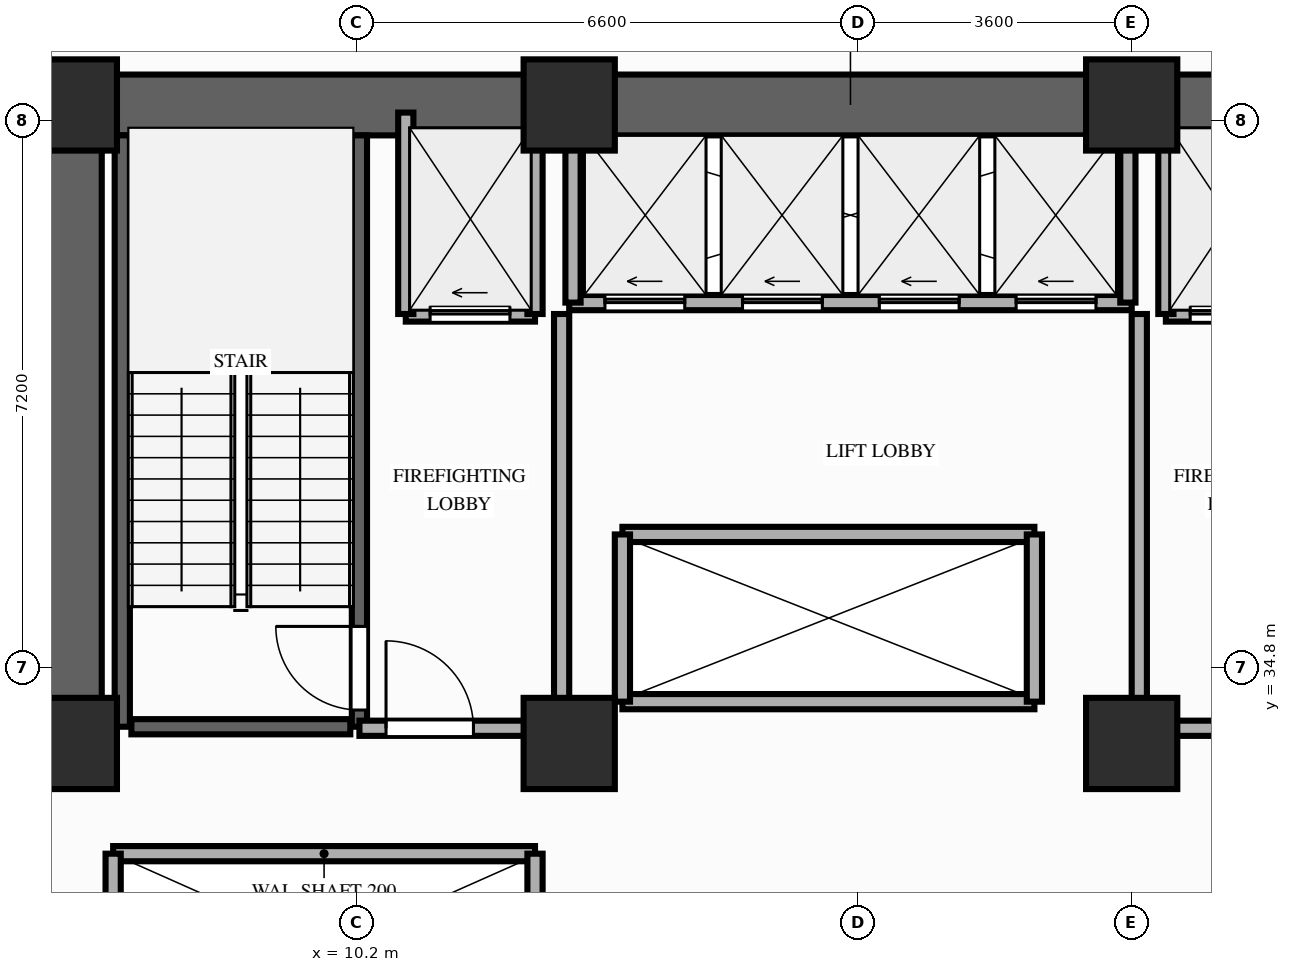
"""IFC4 building model, lengths in metres.
Left out: names, types, materials, properties, quantities, classifications, styles, units other than length and angle.
Written with IfcOpenShell. Run it as: python <this file> out.ifc"""

import sys

from ifc_helpers import new_model, si_unit, direction, frame, frame_2d, origin, origin_2d, place, context, subcontext, project, spatial, rectangle, extrude, element, fill, save


model = new_model("IFC4")
c1 = context("Model", 3, precision=1e-05, world=origin(), true_north=direction((0.0, 1.0)))
c2 = subcontext(c1, "Body", "Model", "MODEL_VIEW")
j1 = project(units=[si_unit("LENGTHUNIT", "METRE"), si_unit("PLANEANGLEUNIT", "RADIAN")], contexts=[c1])
p1 = place(None, origin())
s1 = spatial("IfcSite", under=j1, at=p1, CompositionType="ELEMENT")
p2 = place(p1, origin())
s2 = spatial("IfcBuilding", under=s1, at=p2, CompositionType="ELEMENT")
p3 = place(p2, frame((0.0, 0.0, 17.6)))
s3 = spatial("IfcBuildingStorey", under=s2, at=p3, CompositionType="ELEMENT", Elevation=17.6)
for number, where, z_axis, x_axis in (
    (1, (6.45, 33.8, 0.0), (0.0, 0.0, 1.0), (1.0, 0.0, 0.0)),
    (2, (13.0, 33.8, 0.0), (0.0, 0.0, 1.0), (1.0, 0.0, 0.0)),
    (3, (20.4, 33.8, 0.0), (0.0, 0.0, 1.0), (1.0, 0.0, 0.0)),
    (4, (6.45, 42.2, 0.0), (0.0, 0.0, 1.0), (1.0, 0.0, 0.0)),
    (5, (13.0, 42.2, 0.0), (0.0, 0.0, 1.0), (1.0, 0.0, 0.0)),
    (6, (20.4, 42.2, 0.0), (0.0, 0.0, 1.0), (1.0, 0.0, 0.0)),
):
    element("IfcColumn", number, at=place(p3, frame(where, z_axis=z_axis, x_axis=x_axis)), inside=s3, PredefinedType="COLUMN", context=c2, shape_type="SweptSolid", body=[
        extrude(rectangle(XDim=1.2, YDim=1.2, at=origin_2d()), origin(), (0.0, 0.0, 1.0), 4.2),
    ])
p4 = place(p3, frame((6.45, 42.2, 0.0), z_axis=(0.0, 0.0, 1.0), x_axis=(1.0, 0.0, 0.0)))
e7 = element("IfcWall", 7, at=p4, inside=s3, PredefinedType="SHEAR", context=c2, shape_type="SweptSolid", body=[
    extrude(rectangle(XDim=20.45, YDim=0.8, at=frame_2d((10.225, 0.0))), origin(), (0.0, 0.0, 1.0), 3.9),
])
p5 = place(p3, frame((6.45, 33.8, 0.0), z_axis=(0.0, 0.0, 1.0), x_axis=(0.0, 1.0, 0.0)))
e8 = element("IfcWall", 8, at=p5, inside=s3, PredefinedType="SHEAR", context=c2, shape_type="SweptSolid", body=[
    extrude(rectangle(XDim=7.95, YDim=0.8, at=frame_2d((3.975, 0.0))), origin(), (0.0, 0.0, 1.0), 3.9),
])
p6 = place(p3, frame((7.12, 34.02, 0.0), z_axis=(0.0, 0.0, 1.0), x_axis=(0.0, 1.0, 0.0)))
e9 = element("IfcWall", 9, at=p6, inside=s3, PredefinedType="SHEAR", context=c2, shape_type="SweptSolid", body=[
    extrude(rectangle(XDim=7.78, YDim=0.2, at=frame_2d((3.89, 0.0))), origin(), (0.0, 0.0, 1.0), 3.9),
])
p7 = place(p3, frame((10.24, 34.02, 0.0), z_axis=(0.0, 0.0, 1.0), x_axis=(0.0, 1.0, 0.0)))
e10 = element("IfcWall", 10, at=p7, inside=s3, PredefinedType="SHEAR", context=c2, shape_type="SweptSolid", body=[
    extrude(rectangle(XDim=7.78, YDim=0.2, at=frame_2d((3.89, 0.0))), origin(), (0.0, 0.0, 1.0), 3.9),
])
p8 = place(p7, frame((0.22, 0.0, 0.0)))
e11 = element("IfcOpeningElement", 11, at=p8, cuts=e10, PredefinedType="OPENING", context=c2, shape_type="SweptSolid", body=[
    extrude(rectangle(XDim=1.1, YDim=2.15, at=frame_2d((0.55, 1.075))), frame((0.0, 0.11, 0.0), z_axis=(0.0, -1.0, 0.0), x_axis=(1.0, 0.0, 0.0)), (0.0, 0.0, 1.0), 0.22),
])
p9 = place(p3, frame((7.24, 34.02, 0.0), z_axis=(0.0, 0.0, 1.0), x_axis=(1.0, 0.0, 0.0)))
e12 = element("IfcWall", 12, at=p9, inside=s3, PredefinedType="SHEAR", context=c2, shape_type="SweptSolid", body=[
    extrude(rectangle(XDim=2.88, YDim=0.2, at=frame_2d((1.44, 0.0))), origin(), (0.0, 0.0, 1.0), 3.9),
])
p10 = place(p3, frame((7.0, 32.35, 0.0), z_axis=(0.0, 0.0, 1.0), x_axis=(1.0, 0.0, 0.0)))
e13 = element("IfcWall", 13, at=p10, inside=s3, PredefinedType="MOVABLE", context=c2, shape_type="SweptSolid", body=[
    extrude(rectangle(XDim=5.55, YDim=0.2, at=frame_2d((2.775, 0.0))), origin(), (0.0, 0.0, 1.0), 3.9),
])
for number, where, z_axis, x_axis in (
    (14, (7.0, 29.85, 0.0), (0.0, 0.0, 1.0), (0.0, 1.0, 0.0)),
    (15, (12.55, 29.85, 0.0), (0.0, 0.0, 1.0), (0.0, 1.0, 0.0)),
):
    element("IfcWall", number, at=place(p3, frame(where, z_axis=z_axis, x_axis=x_axis)), inside=s3, PredefinedType="MOVABLE", context=c2, shape_type="SweptSolid", body=[
        extrude(rectangle(XDim=2.5, YDim=0.2, at=frame_2d((1.25, 0.0))), origin(), (0.0, 0.0, 1.0), 3.9),
    ])
p11 = place(p3, frame((10.85, 39.45, 0.0), z_axis=(0.0, 0.0, 1.0), x_axis=(1.0, 0.0, 0.0)))
e16 = element("IfcWall", 16, at=p11, inside=s3, PredefinedType="MOVABLE", context=c2, shape_type="SweptSolid", body=[
    extrude(rectangle(XDim=1.7, YDim=0.2, at=frame_2d((0.85, 0.0))), origin(), (0.0, 0.0, 1.0), 3.9),
])
p12 = place(p11, frame((0.32, 0.0, 0.0)))
e17 = element("IfcOpeningElement", 17, at=p12, cuts=e16, PredefinedType="OPENING", context=c2, shape_type="SweptSolid", body=[
    extrude(rectangle(XDim=1.05, YDim=2.15, at=frame_2d((0.525, 1.075))), frame((0.0, 0.11, 0.0), z_axis=(0.0, -1.0, 0.0), x_axis=(1.0, 0.0, 0.0)), (0.0, 0.0, 1.0), 0.22),
])
p13 = place(p3, frame((20.85, 39.45, 0.0), z_axis=(0.0, 0.0, 1.0), x_axis=(1.0, 0.0, 0.0)))
e18 = element("IfcWall", 18, at=p13, inside=s3, PredefinedType="MOVABLE", context=c2, shape_type="SweptSolid", body=[
    extrude(rectangle(XDim=1.7, YDim=0.2, at=frame_2d((0.85, 0.0))), origin(), (0.0, 0.0, 1.0), 3.9),
])
p14 = place(p13, frame((0.32, 0.0, 0.0)))
e19 = element("IfcOpeningElement", 19, at=p14, cuts=e18, PredefinedType="OPENING", context=c2, shape_type="SweptSolid", body=[
    extrude(rectangle(XDim=1.05, YDim=2.15, at=frame_2d((0.525, 1.075))), frame((0.0, 0.11, 0.0), z_axis=(0.0, -1.0, 0.0), x_axis=(1.0, 0.0, 0.0)), (0.0, 0.0, 1.0), 0.22),
])
for number, where, z_axis, x_axis in (
    (20, (10.85, 39.45, 0.0), (0.0, 0.0, 1.0), (0.0, 1.0, 0.0)),
    (21, (12.55, 39.45, 0.0), (0.0, 0.0, 1.0), (0.0, 1.0, 0.0)),
):
    element("IfcWall", number, at=place(p3, frame(where, z_axis=z_axis, x_axis=x_axis)), inside=s3, PredefinedType="MOVABLE", context=c2, shape_type="SweptSolid", body=[
        extrude(rectangle(XDim=2.65, YDim=0.2, at=frame_2d((1.325, 0.0))), origin(), (0.0, 0.0, 1.0), 3.9),
    ])
p15 = place(p3, frame((12.9, 34.0, 0.0), z_axis=(0.0, 0.0, 1.0), x_axis=(0.0, 1.0, 0.0)))
e22 = element("IfcWall", 22, at=p15, inside=s3, PredefinedType="PARTITIONING", context=c2, shape_type="SweptSolid", body=[
    extrude(rectangle(XDim=5.45, YDim=0.2, at=frame_2d((2.725, 0.0))), origin(), (0.0, 0.0, 1.0), 3.18),
])
p16 = place(p3, frame((10.24, 34.0, 0.0), z_axis=(0.0, 0.0, 1.0), x_axis=(1.0, 0.0, 0.0)))
e23 = element("IfcWall", 23, at=p16, inside=s3, PredefinedType="PARTITIONING", context=c2, shape_type="SweptSolid", body=[
    extrude(rectangle(XDim=2.66, YDim=0.2, at=frame_2d((1.33, 0.0))), origin(), (0.0, 0.0, 1.0), 3.18),
])
p17 = place(p16, frame((0.35, 0.0, 0.0)))
e24 = element("IfcOpeningElement", 24, at=p17, cuts=e23, PredefinedType="OPENING", context=c2, shape_type="SweptSolid", body=[
    extrude(rectangle(XDim=1.15, YDim=2.15, at=frame_2d((0.575, 1.075))), frame((0.0, 0.11, 0.0), z_axis=(0.0, -1.0, 0.0), x_axis=(1.0, 0.0, 0.0)), (0.0, 0.0, 1.0), 0.22),
])
p18 = place(p3, frame((20.85, 39.45, 0.0), z_axis=(0.0, 0.0, 1.0), x_axis=(0.0, 1.0, 0.0)))
e25 = element("IfcWall", 25, at=p18, inside=s3, PredefinedType="MOVABLE", context=c2, shape_type="SweptSolid", body=[
    extrude(rectangle(XDim=2.65, YDim=0.2, at=frame_2d((1.325, 0.0))), origin(), (0.0, 0.0, 1.0), 3.9),
])
p19 = place(p3, frame((20.5, 34.0, 0.0), z_axis=(0.0, 0.0, 1.0), x_axis=(0.0, 1.0, 0.0)))
e26 = element("IfcWall", 26, at=p19, inside=s3, PredefinedType="PARTITIONING", context=c2, shape_type="SweptSolid", body=[
    extrude(rectangle(XDim=5.45, YDim=0.2, at=frame_2d((2.725, 0.0))), origin(), (0.0, 0.0, 1.0), 3.18),
])
p20 = place(p3, frame((20.5, 34.0, 0.0), z_axis=(0.0, 0.0, 1.0), x_axis=(1.0, 0.0, 0.0)))
e27 = element("IfcWall", 27, at=p20, inside=s3, PredefinedType="PARTITIONING", context=c2, shape_type="SweptSolid", body=[
    extrude(rectangle(XDim=2.6, YDim=0.2, at=frame_2d((1.3, 0.0))), origin(), (0.0, 0.0, 1.0), 3.18),
])
p21 = place(p20, frame((1.05, 0.0, 0.0)))
e28 = element("IfcOpeningElement", 28, at=p21, cuts=e27, PredefinedType="OPENING", context=c2, shape_type="SweptSolid", body=[
    extrude(rectangle(XDim=1.15, YDim=2.15, at=frame_2d((0.575, 1.075))), frame((0.0, 0.11, 0.0), z_axis=(0.0, -1.0, 0.0), x_axis=(1.0, 0.0, 0.0)), (0.0, 0.0, 1.0), 0.22),
])
p22 = place(p3, frame((13.0, 39.6, 0.0), z_axis=(0.0, 0.0, 1.0), x_axis=(1.0, 0.0, 0.0)))
e29 = element("IfcWall", 29, at=p22, inside=s3, PredefinedType="MOVABLE", context=c2, shape_type="SweptSolid", body=[
    extrude(rectangle(XDim=7.4, YDim=0.2, at=frame_2d((3.7, 0.0))), origin(), (0.0, 0.0, 1.0), 3.9),
])
p23 = place(p22, frame((0.47, 0.0, 0.0)))
e30 = element("IfcOpeningElement", 30, at=p23, cuts=e29, PredefinedType="OPENING", context=c2, shape_type="SweptSolid", body=[
    extrude(rectangle(XDim=1.05, YDim=2.15, at=frame_2d((0.525, 1.075))), frame((0.0, 0.11, 0.0), z_axis=(0.0, -1.0, 0.0), x_axis=(1.0, 0.0, 0.0)), (0.0, 0.0, 1.0), 0.22),
])
p24 = place(p22, frame((2.28, 0.0, 0.0)))
e31 = element("IfcOpeningElement", 31, at=p24, cuts=e29, PredefinedType="OPENING", context=c2, shape_type="SweptSolid", body=[
    extrude(rectangle(XDim=1.05, YDim=2.15, at=frame_2d((0.525, 1.075))), frame((0.0, 0.11, 0.0), z_axis=(0.0, -1.0, 0.0), x_axis=(1.0, 0.0, 0.0)), (0.0, 0.0, 1.0), 0.22),
])
p25 = place(p22, frame((4.08, 0.0, 0.0)))
e32 = element("IfcOpeningElement", 32, at=p25, cuts=e29, PredefinedType="OPENING", context=c2, shape_type="SweptSolid", body=[
    extrude(rectangle(XDim=1.05, YDim=2.15, at=frame_2d((0.525, 1.075))), frame((0.0, 0.11, 0.0), z_axis=(0.0, -1.0, 0.0), x_axis=(1.0, 0.0, 0.0)), (0.0, 0.0, 1.0), 0.22),
])
p26 = place(p22, frame((5.88, 0.0, 0.0)))
e33 = element("IfcOpeningElement", 33, at=p26, cuts=e29, PredefinedType="OPENING", context=c2, shape_type="SweptSolid", body=[
    extrude(rectangle(XDim=1.05, YDim=2.15, at=frame_2d((0.525, 1.075))), frame((0.0, 0.11, 0.0), z_axis=(0.0, -1.0, 0.0), x_axis=(1.0, 0.0, 0.0)), (0.0, 0.0, 1.0), 0.22),
])
for number, where, z_axis, x_axis in (
    (34, (13.05, 39.6, 0.0), (0.0, 0.0, 1.0), (0.0, 1.0, 0.0)),
    (35, (20.35, 39.6, 0.0), (0.0, 0.0, 1.0), (0.0, 1.0, 0.0)),
):
    element("IfcWall", number, at=place(p3, frame(where, z_axis=z_axis, x_axis=x_axis)), inside=s3, PredefinedType="MOVABLE", context=c2, shape_type="SweptSolid", body=[
        extrude(rectangle(XDim=2.18, YDim=0.2, at=frame_2d((1.09, 0.0))), origin(), (0.0, 0.0, 1.0), 3.9),
    ])
for number, where, z_axis, x_axis in (
    (36, (13.7, 34.35, 0.0), (0.0, 0.0, 1.0), (1.0, 0.0, 0.0)),
    (37, (13.7, 36.55, 0.0), (0.0, 0.0, 1.0), (1.0, 0.0, 0.0)),
):
    element("IfcWall", number, at=place(p3, frame(where, z_axis=z_axis, x_axis=x_axis)), inside=s3, PredefinedType="MOVABLE", context=c2, shape_type="SweptSolid", body=[
        extrude(rectangle(XDim=5.42, YDim=0.2, at=frame_2d((2.71, 0.0))), origin(), (0.0, 0.0, 1.0), 3.9),
    ])
for number, where, z_axis, x_axis in (
    (38, (13.7, 34.35, 0.0), (0.0, 0.0, 1.0), (0.0, 1.0, 0.0)),
    (39, (19.12, 34.35, 0.0), (0.0, 0.0, 1.0), (0.0, 1.0, 0.0)),
):
    element("IfcWall", number, at=place(p3, frame(where, z_axis=z_axis, x_axis=x_axis)), inside=s3, PredefinedType="MOVABLE", context=c2, shape_type="SweptSolid", body=[
        extrude(rectangle(XDim=2.2, YDim=0.2, at=frame_2d((1.1, 0.0))), origin(), (0.0, 0.0, 1.0), 3.9),
    ])
p27 = place(p8, origin())
e40 = element("IfcDoor", 40, at=p27, inside=s3, OperationType="SINGLE_SWING_RIGHT", PredefinedType="DOOR", context=c2, shape_type="SweptSolid", body=[
    extrude(rectangle(XDim=1.1, YDim=2.15, at=frame_2d((0.55, 1.075))), frame((0.0, 0.025, 0.0), z_axis=(0.0, -1.0, 0.0), x_axis=(1.0, 0.0, 0.0)), (0.0, 0.0, 1.0), 0.05),
])
fill(e11, e40)
p28 = place(p12, origin())
e41 = element("IfcDoor", 41, at=p28, inside=s3, OperationType="SLIDING_TO_LEFT", PredefinedType="DOOR", context=c2, shape_type="SweptSolid", body=[
    extrude(rectangle(XDim=1.05, YDim=2.15, at=frame_2d((0.525, 1.075))), frame((0.0, 0.025, 0.0), z_axis=(0.0, -1.0, 0.0), x_axis=(1.0, 0.0, 0.0)), (0.0, 0.0, 1.0), 0.05),
])
fill(e17, e41)
p29 = place(p14, origin())
e42 = element("IfcDoor", 42, at=p29, inside=s3, OperationType="SLIDING_TO_LEFT", PredefinedType="DOOR", context=c2, shape_type="SweptSolid", body=[
    extrude(rectangle(XDim=1.05, YDim=2.15, at=frame_2d((0.525, 1.075))), frame((0.0, 0.025, 0.0), z_axis=(0.0, -1.0, 0.0), x_axis=(1.0, 0.0, 0.0)), (0.0, 0.0, 1.0), 0.05),
])
fill(e19, e42)
p30 = place(p17, origin())
e43 = element("IfcDoor", 43, at=p30, inside=s3, OperationType="SINGLE_SWING_LEFT", PredefinedType="DOOR", context=c2, shape_type="SweptSolid", body=[
    extrude(rectangle(XDim=1.15, YDim=2.15, at=frame_2d((0.575, 1.075))), frame((0.0, 0.025, 0.0), z_axis=(0.0, -1.0, 0.0), x_axis=(1.0, 0.0, 0.0)), (0.0, 0.0, 1.0), 0.05),
])
fill(e24, e43)
p31 = place(p23, origin())
e44 = element("IfcDoor", 44, at=p31, inside=s3, OperationType="SLIDING_TO_LEFT", PredefinedType="DOOR", context=c2, shape_type="SweptSolid", body=[
    extrude(rectangle(XDim=1.05, YDim=2.15, at=frame_2d((0.525, 1.075))), frame((0.0, 0.025, 0.0), z_axis=(0.0, -1.0, 0.0), x_axis=(1.0, 0.0, 0.0)), (0.0, 0.0, 1.0), 0.05),
])
fill(e30, e44)
p32 = place(p24, origin())
e45 = element("IfcDoor", 45, at=p32, inside=s3, OperationType="SLIDING_TO_LEFT", PredefinedType="DOOR", context=c2, shape_type="SweptSolid", body=[
    extrude(rectangle(XDim=1.05, YDim=2.15, at=frame_2d((0.525, 1.075))), frame((0.0, 0.025, 0.0), z_axis=(0.0, -1.0, 0.0), x_axis=(1.0, 0.0, 0.0)), (0.0, 0.0, 1.0), 0.05),
])
fill(e31, e45)
p33 = place(p25, origin())
e46 = element("IfcDoor", 46, at=p33, inside=s3, OperationType="SLIDING_TO_LEFT", PredefinedType="DOOR", context=c2, shape_type="SweptSolid", body=[
    extrude(rectangle(XDim=1.05, YDim=2.15, at=frame_2d((0.525, 1.075))), frame((0.0, 0.025, 0.0), z_axis=(0.0, -1.0, 0.0), x_axis=(1.0, 0.0, 0.0)), (0.0, 0.0, 1.0), 0.05),
])
fill(e32, e46)
p34 = place(p26, origin())
e47 = element("IfcDoor", 47, at=p34, inside=s3, OperationType="SLIDING_TO_LEFT", PredefinedType="DOOR", context=c2, shape_type="SweptSolid", body=[
    extrude(rectangle(XDim=1.05, YDim=2.15, at=frame_2d((0.525, 1.075))), frame((0.0, 0.025, 0.0), z_axis=(0.0, -1.0, 0.0), x_axis=(1.0, 0.0, 0.0)), (0.0, 0.0, 1.0), 0.05),
])
fill(e33, e47)
save(model, sys.argv[1])
